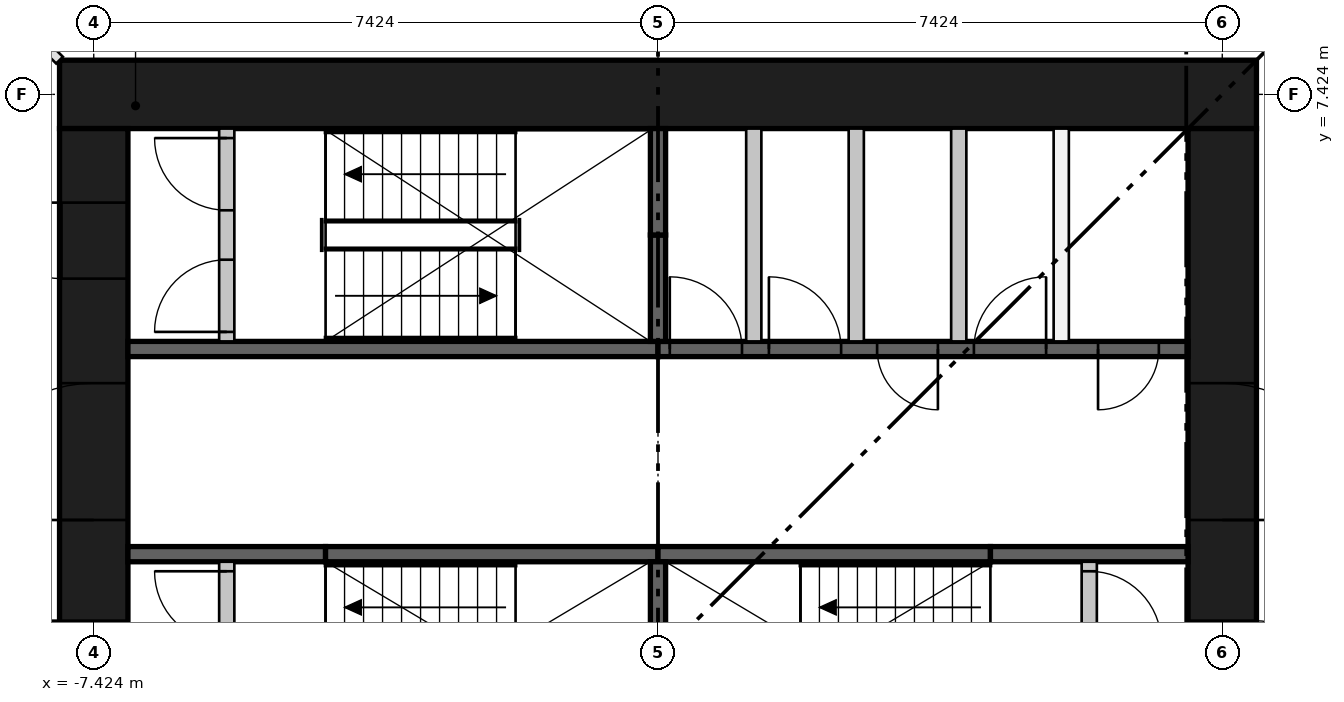
"""IFC4 building model, lengths in metres.
Left out: names, types, materials, properties, quantities, classifications, styles, units other than length and angle.
Written with IfcOpenShell. Run it as: python <this file> out.ifc"""

import sys

from ifc_helpers import new_model, si_unit, direction, frame, frame_2d, origin, place, context, subcontext, project, spatial, rectangle, extrude, element, fill, save


model = new_model("IFC4")
c1 = context("Model", 3, precision=1e-05, world=origin(), true_north=direction((0.0, 1.0)))
c2 = subcontext(c1, "Body", "Model", "MODEL_VIEW")
j1 = project(units=[si_unit("LENGTHUNIT", "METRE"), si_unit("PLANEANGLEUNIT", "RADIAN")], contexts=[c1])
p1 = place(None, origin())
s1 = spatial("IfcSite", under=j1, at=p1, CompositionType="ELEMENT")
p2 = place(p1, origin())
s2 = spatial("IfcBuilding", under=s1, at=p2, CompositionType="ELEMENT")
p3 = place(p2, frame((0.0, 0.0, 9.9)))
s3 = spatial("IfcBuildingStorey", under=s2, at=p3, CompositionType="ELEMENT", Elevation=9.9)
p4 = place(p3, frame((-7.874, 7.424, 0.0), z_axis=(0.0, 0.0, 1.0), x_axis=(1.0, 0.0, 0.0)))
e1 = element("IfcWall", 1, at=p4, inside=s3, PredefinedType="SHEAR", context=c2, shape_type="SweptSolid", body=[
    extrude(rectangle(XDim=15.748, YDim=0.9, at=frame_2d((7.874, 0.0))), origin(), (0.0, 0.0, 1.0), 4.5),
])
p5 = place(p3, frame((-7.424, -6.974, 0.0), z_axis=(0.0, 0.0, 1.0), x_axis=(0.0, 1.0, 0.0)))
e2 = element("IfcWall", 2, at=p5, inside=s3, PredefinedType="SHEAR", context=c2, shape_type="SweptSolid", body=[
    extrude(rectangle(XDim=13.948, YDim=0.9, at=frame_2d((6.974, 0.0))), origin(), (0.0, 0.0, 1.0), 4.5),
])
p6 = place(p5, frame((6.474, 0.0, 0.0)))
e3 = element("IfcOpeningElement", 3, at=p6, cuts=e2, PredefinedType="OPENING", context=c2, shape_type="SweptSolid", body=[
    extrude(rectangle(XDim=1.0, YDim=2.1, at=frame_2d((0.5, 1.05))), frame((0.0, 0.46, 0.0), z_axis=(0.0, -1.0, 0.0), x_axis=(1.0, 0.0, 0.0)), (0.0, 0.0, 1.0), 0.92),
])
p7 = place(p5, frame((3.35, 0.0, 0.0)))
e4 = element("IfcOpeningElement", 4, at=p7, cuts=e2, PredefinedType="OPENING", context=c2, shape_type="SweptSolid", body=[
    extrude(rectangle(XDim=1.8, YDim=2.1, at=frame_2d((0.9, 1.05))), frame((0.0, 0.46, 0.0), z_axis=(0.0, -1.0, 0.0), x_axis=(1.0, 0.0, 0.0)), (0.0, 0.0, 1.0), 0.92),
])
p8 = place(p5, frame((8.799, 0.0, 0.0)))
e5 = element("IfcOpeningElement", 5, at=p8, cuts=e2, PredefinedType="OPENING", context=c2, shape_type="SweptSolid", body=[
    extrude(rectangle(XDim=1.8, YDim=2.1, at=frame_2d((0.9, 1.05))), frame((0.0, 0.46, 0.0), z_axis=(0.0, -1.0, 0.0), x_axis=(1.0, 0.0, 0.0)), (0.0, 0.0, 1.0), 0.92),
])
p9 = place(p5, frame((11.974, 0.0, 0.0)))
e6 = element("IfcOpeningElement", 6, at=p9, cuts=e2, PredefinedType="OPENING", context=c2, shape_type="SweptSolid", body=[
    extrude(rectangle(XDim=1.0, YDim=2.1, at=frame_2d((0.5, 1.05))), frame((0.0, 0.46, 0.0), z_axis=(0.0, -1.0, 0.0), x_axis=(1.0, 0.0, 0.0)), (0.0, 0.0, 1.0), 0.92),
])
p10 = place(p3, frame((7.424, -6.974, 0.0), z_axis=(0.0, 0.0, 1.0), x_axis=(0.0, 1.0, 0.0)))
e7 = element("IfcWall", 7, at=p10, inside=s3, PredefinedType="SHEAR", context=c2, shape_type="SweptSolid", body=[
    extrude(rectangle(XDim=13.948, YDim=0.9, at=frame_2d((6.974, 0.0))), origin(), (0.0, 0.0, 1.0), 4.5),
])
p11 = place(p10, frame((6.474, 0.0, 0.0)))
e8 = element("IfcOpeningElement", 8, at=p11, cuts=e7, PredefinedType="OPENING", context=c2, shape_type="SweptSolid", body=[
    extrude(rectangle(XDim=1.0, YDim=2.1, at=frame_2d((0.5, 1.05))), frame((0.0, 0.46, 0.0), z_axis=(0.0, -1.0, 0.0), x_axis=(1.0, 0.0, 0.0)), (0.0, 0.0, 1.0), 0.92),
])
p12 = place(p10, frame((3.35, 0.0, 0.0)))
e9 = element("IfcOpeningElement", 9, at=p12, cuts=e7, PredefinedType="OPENING", context=c2, shape_type="SweptSolid", body=[
    extrude(rectangle(XDim=1.8, YDim=2.1, at=frame_2d((0.9, 1.05))), frame((0.0, 0.46, 0.0), z_axis=(0.0, -1.0, 0.0), x_axis=(1.0, 0.0, 0.0)), (0.0, 0.0, 1.0), 0.92),
])
p13 = place(p10, frame((8.799, 0.0, 0.0)))
e10 = element("IfcOpeningElement", 10, at=p13, cuts=e7, PredefinedType="OPENING", context=c2, shape_type="SweptSolid", body=[
    extrude(rectangle(XDim=1.8, YDim=2.1, at=frame_2d((0.9, 1.05))), frame((0.0, 0.46, 0.0), z_axis=(0.0, -1.0, 0.0), x_axis=(1.0, 0.0, 0.0)), (0.0, 0.0, 1.0), 0.92),
])
p14 = place(p3, frame((-6.974, 4.074, 0.0), z_axis=(0.0, 0.0, 1.0), x_axis=(1.0, 0.0, 0.0)))
e11 = element("IfcWall", 11, at=p14, inside=s3, PredefinedType="SHEAR", context=c2, shape_type="SweptSolid", body=[
    extrude(rectangle(XDim=6.974, YDim=0.2, at=frame_2d((3.487, 0.0))), origin(), (0.0, 0.0, 1.0), 4.1),
])
p15 = place(p3, frame((0.0, 4.074, 0.0), z_axis=(0.0, 0.0, 1.0), x_axis=(1.0, 0.0, 0.0)))
e12 = element("IfcWall", 12, at=p15, inside=s3, PredefinedType="SHEAR", context=c2, shape_type="SweptSolid", body=[
    extrude(rectangle(XDim=6.974, YDim=0.2, at=frame_2d((3.487, 0.0))), origin(), (0.0, 0.0, 1.0), 4.1),
])
p16 = place(p15, frame((0.155, 0.0, 0.0)))
e13 = element("IfcOpeningElement", 13, at=p16, cuts=e12, PredefinedType="OPENING", context=c2, shape_type="SweptSolid", body=[
    extrude(rectangle(XDim=0.95, YDim=2.1, at=frame_2d((0.475, 1.05))), frame((0.0, 0.11, 0.0), z_axis=(0.0, -1.0, 0.0), x_axis=(1.0, 0.0, 0.0)), (0.0, 0.0, 1.0), 0.22),
])
p17 = place(p15, frame((1.459, 0.0, 0.0)))
e14 = element("IfcOpeningElement", 14, at=p17, cuts=e12, PredefinedType="OPENING", context=c2, shape_type="SweptSolid", body=[
    extrude(rectangle(XDim=0.95, YDim=2.1, at=frame_2d((0.475, 1.05))), frame((0.0, 0.11, 0.0), z_axis=(0.0, -1.0, 0.0), x_axis=(1.0, 0.0, 0.0)), (0.0, 0.0, 1.0), 0.22),
])
p18 = place(p15, frame((2.883, 0.0, 0.0)))
e15 = element("IfcOpeningElement", 15, at=p18, cuts=e12, PredefinedType="OPENING", context=c2, shape_type="SweptSolid", body=[
    extrude(rectangle(XDim=0.8, YDim=2.1, at=frame_2d((0.4, 1.05))), frame((0.0, 0.11, 0.0), z_axis=(0.0, -1.0, 0.0), x_axis=(1.0, 0.0, 0.0)), (0.0, 0.0, 1.0), 0.22),
])
p19 = place(p15, frame((4.156, 0.0, 0.0)))
e16 = element("IfcOpeningElement", 16, at=p19, cuts=e12, PredefinedType="OPENING", context=c2, shape_type="SweptSolid", body=[
    extrude(rectangle(XDim=0.95, YDim=2.1, at=frame_2d((0.475, 1.05))), frame((0.0, 0.11, 0.0), z_axis=(0.0, -1.0, 0.0), x_axis=(1.0, 0.0, 0.0)), (0.0, 0.0, 1.0), 0.22),
])
p20 = place(p15, frame((5.79, 0.0, 0.0)))
e17 = element("IfcOpeningElement", 17, at=p20, cuts=e12, PredefinedType="OPENING", context=c2, shape_type="SweptSolid", body=[
    extrude(rectangle(XDim=0.8, YDim=2.1, at=frame_2d((0.4, 1.05))), frame((0.0, 0.11, 0.0), z_axis=(0.0, -1.0, 0.0), x_axis=(1.0, 0.0, 0.0)), (0.0, 0.0, 1.0), 0.22),
])
p21 = place(p3, frame((-6.974, 1.375, 0.0), z_axis=(0.0, 0.0, 1.0), x_axis=(1.0, 0.0, 0.0)))
e18 = element("IfcWall", 18, at=p21, inside=s3, PredefinedType="SHEAR", context=c2, shape_type="SweptSolid", body=[
    extrude(rectangle(XDim=2.6, YDim=0.2, at=frame_2d((1.3, 0.0))), origin(), (0.0, 0.0, 1.0), 4.1),
])
for number, where, z_axis, x_axis in (
    (19, (-4.374, 1.375, 0.0), (0.0, 0.0, 1.0), (1.0, 0.0, 0.0)),
    (20, (0.0, 1.375, 0.0), (0.0, 0.0, 1.0), (1.0, 0.0, 0.0)),
):
    element("IfcWall", number, at=place(p3, frame(where, z_axis=z_axis, x_axis=x_axis)), inside=s3, PredefinedType="SHEAR", context=c2, shape_type="SweptSolid", body=[
        extrude(rectangle(XDim=4.374, YDim=0.2, at=frame_2d((2.187, 0.0))), origin(), (0.0, 0.0, 1.0), 4.1),
    ])
p22 = place(p3, frame((4.374, 1.375, 0.0), z_axis=(0.0, 0.0, 1.0), x_axis=(1.0, 0.0, 0.0)))
e21 = element("IfcWall", 21, at=p22, inside=s3, PredefinedType="SHEAR", context=c2, shape_type="SweptSolid", body=[
    extrude(rectangle(XDim=2.6, YDim=0.2, at=frame_2d((1.3, 0.0))), origin(), (0.0, 0.0, 1.0), 4.1),
])
p23 = place(p3, frame((0.0, -1.275, 0.0), z_axis=(0.0, 0.0, 1.0), x_axis=(0.0, 1.0, 0.0)))
e22 = element("IfcWall", 22, at=p23, inside=s3, PredefinedType="SHEAR", context=c2, shape_type="SweptSolid", body=[
    extrude(rectangle(XDim=2.55, YDim=0.2, at=frame_2d((1.275, 0.0))), origin(), (0.0, 0.0, 1.0), 4.1),
])
p24 = place(p3, frame((0.0, 4.174, 0.0), z_axis=(0.0, 0.0, 1.0), x_axis=(0.0, 1.0, 0.0)))
e23 = element("IfcWall", 23, at=p24, inside=s3, PredefinedType="SHEAR", context=c2, shape_type="SweptSolid", body=[
    extrude(rectangle(XDim=1.4, YDim=0.2, at=frame_2d((0.7, 0.0))), origin(), (0.0, 0.0, 1.0), 4.1),
])
p25 = place(p3, frame((0.0, 5.574, 0.0), z_axis=(0.0, 0.0, 1.0), x_axis=(0.0, 1.0, 0.0)))
e24 = element("IfcWall", 24, at=p25, inside=s3, PredefinedType="SHEAR", context=c2, shape_type="SweptSolid", body=[
    extrude(rectangle(XDim=1.4, YDim=0.2, at=frame_2d((0.7, 0.0))), origin(), (0.0, 0.0, 1.0), 4.1),
])
for number, where, z_axis, x_axis in (
    (25, (1.26, 4.174, 0.0), (0.0, 0.0, 1.0), (0.0, 1.0, 0.0)),
    (26, (2.609, 4.174, 0.0), (0.0, 0.0, 1.0), (0.0, 1.0, 0.0)),
    (27, (3.957, 4.174, 0.0), (0.0, 0.0, 1.0), (0.0, 1.0, 0.0)),
    (28, (5.305, 4.174, 0.0), (0.0, 0.0, 1.0), (0.0, 1.0, 0.0)),
):
    element("IfcWall", number, at=place(p3, frame(where, z_axis=z_axis, x_axis=x_axis)), inside=s3, PredefinedType="PARTITIONING", context=c2, shape_type="SweptSolid", body=[
        extrude(rectangle(XDim=2.8, YDim=0.2, at=frame_2d((1.4, 0.0))), origin(), (0.0, 0.0, 1.0), 4.1),
    ])
p26 = place(p3, frame((-5.674, -1.275, 0.0), z_axis=(0.0, 0.0, 1.0), x_axis=(0.0, 1.0, 0.0)))
e29 = element("IfcWall", 29, at=p26, inside=s3, PredefinedType="PARTITIONING", context=c2, shape_type="SweptSolid", body=[
    extrude(rectangle(XDim=2.55, YDim=0.2, at=frame_2d((1.275, 0.0))), origin(), (0.0, 0.0, 1.0), 4.1),
])
p27 = place(p26, frame((0.125, 0.0, 0.0)))
e30 = element("IfcOpeningElement", 30, at=p27, cuts=e29, PredefinedType="OPENING", context=c2, shape_type="SweptSolid", body=[
    extrude(rectangle(XDim=0.95, YDim=2.1, at=frame_2d((0.475, 1.05))), frame((0.0, 0.11, 0.0), z_axis=(0.0, -1.0, 0.0), x_axis=(1.0, 0.0, 0.0)), (0.0, 0.0, 1.0), 0.22),
])
p28 = place(p26, frame((1.475, 0.0, 0.0)))
e31 = element("IfcOpeningElement", 31, at=p28, cuts=e29, PredefinedType="OPENING", context=c2, shape_type="SweptSolid", body=[
    extrude(rectangle(XDim=0.95, YDim=2.1, at=frame_2d((0.475, 1.05))), frame((0.0, 0.11, 0.0), z_axis=(0.0, -1.0, 0.0), x_axis=(1.0, 0.0, 0.0)), (0.0, 0.0, 1.0), 0.22),
])
p29 = place(p3, frame((5.674, -1.275, 0.0), z_axis=(0.0, 0.0, 1.0), x_axis=(0.0, 1.0, 0.0)))
e32 = element("IfcWall", 32, at=p29, inside=s3, PredefinedType="PARTITIONING", context=c2, shape_type="SweptSolid", body=[
    extrude(rectangle(XDim=2.55, YDim=0.2, at=frame_2d((1.275, 0.0))), origin(), (0.0, 0.0, 1.0), 4.1),
])
p30 = place(p29, frame((0.125, 0.0, 0.0)))
e33 = element("IfcOpeningElement", 33, at=p30, cuts=e32, PredefinedType="OPENING", context=c2, shape_type="SweptSolid", body=[
    extrude(rectangle(XDim=0.95, YDim=2.1, at=frame_2d((0.475, 1.05))), frame((0.0, 0.11, 0.0), z_axis=(0.0, -1.0, 0.0), x_axis=(1.0, 0.0, 0.0)), (0.0, 0.0, 1.0), 0.22),
])
p31 = place(p29, frame((1.475, 0.0, 0.0)))
e34 = element("IfcOpeningElement", 34, at=p31, cuts=e32, PredefinedType="OPENING", context=c2, shape_type="SweptSolid", body=[
    extrude(rectangle(XDim=0.95, YDim=2.1, at=frame_2d((0.475, 1.05))), frame((0.0, 0.11, 0.0), z_axis=(0.0, -1.0, 0.0), x_axis=(1.0, 0.0, 0.0)), (0.0, 0.0, 1.0), 0.22),
])
p32 = place(p3, frame((-5.674, 4.174, 0.0), z_axis=(0.0, 0.0, 1.0), x_axis=(0.0, 1.0, 0.0)))
e35 = element("IfcWall", 35, at=p32, inside=s3, PredefinedType="PARTITIONING", context=c2, shape_type="SweptSolid", body=[
    extrude(rectangle(XDim=2.8, YDim=0.2, at=frame_2d((1.4, 0.0))), origin(), (0.0, 0.0, 1.0), 4.1),
])
p33 = place(p32, frame((0.125, 0.0, 0.0)))
e36 = element("IfcOpeningElement", 36, at=p33, cuts=e35, PredefinedType="OPENING", context=c2, shape_type="SweptSolid", body=[
    extrude(rectangle(XDim=0.95, YDim=2.1, at=frame_2d((0.475, 1.05))), frame((0.0, 0.11, 0.0), z_axis=(0.0, -1.0, 0.0), x_axis=(1.0, 0.0, 0.0)), (0.0, 0.0, 1.0), 0.22),
])
p34 = place(p32, frame((1.725, 0.0, 0.0)))
e37 = element("IfcOpeningElement", 37, at=p34, cuts=e35, PredefinedType="OPENING", context=c2, shape_type="SweptSolid", body=[
    extrude(rectangle(XDim=0.95, YDim=2.1, at=frame_2d((0.475, 1.05))), frame((0.0, 0.11, 0.0), z_axis=(0.0, -1.0, 0.0), x_axis=(1.0, 0.0, 0.0)), (0.0, 0.0, 1.0), 0.22),
])
p35 = place(p3, frame((-7.874, 7.874, 0.0), z_axis=(0.0, 0.0, 1.0), x_axis=(-0.707106781187, 0.707106781187, 0.0)))
e38 = element("IfcWall", 38, at=p35, inside=s3, PredefinedType="PARTITIONING", context=c2, shape_type="SweptSolid", body=[
    extrude(rectangle(XDim=2.165, YDim=0.125, at=frame_2d((1.082, 0.0))), origin(), (0.0, 0.0, 1.0), 4.1),
])
p36 = place(p35, frame((0.6, 0.0, 0.0)))
e39 = element("IfcOpeningElement", 39, at=p36, cuts=e38, PredefinedType="OPENING", context=c2, shape_type="SweptSolid", body=[
    extrude(rectangle(XDim=1.0, YDim=2.1, at=frame_2d((0.5, 1.05))), frame((0.0, 0.073, 0.0), z_axis=(0.0, -1.0, 0.0), x_axis=(1.0, 0.0, 0.0)), (0.0, 0.0, 1.0), 0.145),
])
p37 = place(p28, origin())
e40 = element("IfcDoor", 40, at=p37, inside=s3, OperationType="SINGLE_SWING_RIGHT", PredefinedType="DOOR", context=c2, shape_type="SweptSolid", body=[
    extrude(rectangle(XDim=0.95, YDim=2.1, at=frame_2d((0.475, 1.05))), frame((0.0, 0.025, 0.0), z_axis=(0.0, -1.0, 0.0), x_axis=(1.0, 0.0, 0.0)), (0.0, 0.0, 1.0), 0.05),
])
fill(e31, e40)
p38 = place(p31, frame((0.95, 0.0, 0.0), z_axis=(0.0, 0.0, 1.0), x_axis=(-1.0, 0.0, 0.0)))
e41 = element("IfcDoor", 41, at=p38, inside=s3, OperationType="SINGLE_SWING_LEFT", PredefinedType="DOOR", context=c2, shape_type="SweptSolid", body=[
    extrude(rectangle(XDim=0.95, YDim=2.1, at=frame_2d((0.475, 1.05))), frame((0.0, 0.025, 0.0), z_axis=(0.0, -1.0, 0.0), x_axis=(1.0, 0.0, 0.0)), (0.0, 0.0, 1.0), 0.05),
])
fill(e34, e41)
p39 = place(p33, origin())
e42 = element("IfcDoor", 42, at=p39, inside=s3, OperationType="SINGLE_SWING_LEFT", PredefinedType="DOOR", context=c2, shape_type="SweptSolid", body=[
    extrude(rectangle(XDim=0.95, YDim=2.1, at=frame_2d((0.475, 1.05))), frame((0.0, 0.025, 0.0), z_axis=(0.0, -1.0, 0.0), x_axis=(1.0, 0.0, 0.0)), (0.0, 0.0, 1.0), 0.05),
])
fill(e36, e42)
p40 = place(p34, origin())
e43 = element("IfcDoor", 43, at=p40, inside=s3, OperationType="SINGLE_SWING_RIGHT", PredefinedType="DOOR", context=c2, shape_type="SweptSolid", body=[
    extrude(rectangle(XDim=0.95, YDim=2.1, at=frame_2d((0.475, 1.05))), frame((0.0, 0.025, 0.0), z_axis=(0.0, -1.0, 0.0), x_axis=(1.0, 0.0, 0.0)), (0.0, 0.0, 1.0), 0.05),
])
fill(e37, e43)
p41 = place(p16, origin())
e44 = element("IfcDoor", 44, at=p41, inside=s3, OperationType="SINGLE_SWING_LEFT", PredefinedType="DOOR", context=c2, shape_type="SweptSolid", body=[
    extrude(rectangle(XDim=0.95, YDim=2.1, at=frame_2d((0.475, 1.05))), frame((0.0, 0.025, 0.0), z_axis=(0.0, -1.0, 0.0), x_axis=(1.0, 0.0, 0.0)), (0.0, 0.0, 1.0), 0.05),
])
fill(e13, e44)
p42 = place(p17, origin())
e45 = element("IfcDoor", 45, at=p42, inside=s3, OperationType="SINGLE_SWING_LEFT", PredefinedType="DOOR", context=c2, shape_type="SweptSolid", body=[
    extrude(rectangle(XDim=0.95, YDim=2.1, at=frame_2d((0.475, 1.05))), frame((0.0, 0.025, 0.0), z_axis=(0.0, -1.0, 0.0), x_axis=(1.0, 0.0, 0.0)), (0.0, 0.0, 1.0), 0.05),
])
fill(e14, e45)
p43 = place(p18, frame((0.8, 0.0, 0.0), z_axis=(0.0, 0.0, 1.0), x_axis=(-1.0, 0.0, 0.0)))
e46 = element("IfcDoor", 46, at=p43, inside=s3, OperationType="SINGLE_SWING_RIGHT", PredefinedType="DOOR", context=c2, shape_type="SweptSolid", body=[
    extrude(rectangle(XDim=0.8, YDim=2.1, at=frame_2d((0.4, 1.05))), frame((0.0, 0.025, 0.0), z_axis=(0.0, -1.0, 0.0), x_axis=(1.0, 0.0, 0.0)), (0.0, 0.0, 1.0), 0.05),
])
fill(e15, e46)
p44 = place(p19, origin())
e47 = element("IfcDoor", 47, at=p44, inside=s3, OperationType="SINGLE_SWING_RIGHT", PredefinedType="DOOR", context=c2, shape_type="SweptSolid", body=[
    extrude(rectangle(XDim=0.95, YDim=2.1, at=frame_2d((0.475, 1.05))), frame((0.0, 0.025, 0.0), z_axis=(0.0, -1.0, 0.0), x_axis=(1.0, 0.0, 0.0)), (0.0, 0.0, 1.0), 0.05),
])
fill(e16, e47)
p45 = place(p20, frame((0.8, 0.0, 0.0), z_axis=(0.0, 0.0, 1.0), x_axis=(-1.0, 0.0, 0.0)))
e48 = element("IfcDoor", 48, at=p45, inside=s3, OperationType="SINGLE_SWING_LEFT", PredefinedType="DOOR", context=c2, shape_type="SweptSolid", body=[
    extrude(rectangle(XDim=0.8, YDim=2.1, at=frame_2d((0.4, 1.05))), frame((0.0, 0.025, 0.0), z_axis=(0.0, -1.0, 0.0), x_axis=(1.0, 0.0, 0.0)), (0.0, 0.0, 1.0), 0.05),
])
fill(e17, e48)
p46 = place(p6, origin())
e49 = element("IfcDoor", 49, at=p46, inside=s3, OperationType="SINGLE_SWING_RIGHT", PredefinedType="DOOR", context=c2, shape_type="SweptSolid", body=[
    extrude(rectangle(XDim=1.0, YDim=2.1, at=frame_2d((0.5, 1.05))), frame((0.0, 0.45, 0.0), z_axis=(0.0, -1.0, 0.0), x_axis=(1.0, 0.0, 0.0)), (0.0, 0.0, 1.0), 0.05),
])
fill(e3, e49)
p47 = place(p8, origin())
e50 = element("IfcDoor", 50, at=p47, inside=s3, OperationType="DOUBLE_DOOR_SINGLE_SWING", PredefinedType="DOOR", context=c2, shape_type="SweptSolid", body=[
    extrude(rectangle(XDim=1.8, YDim=2.1, at=frame_2d((0.9, 1.05))), frame((0.0, 0.025, 0.0), z_axis=(0.0, -1.0, 0.0), x_axis=(1.0, 0.0, 0.0)), (0.0, 0.0, 1.0), 0.05),
])
fill(e5, e50)
p48 = place(p9, origin())
e51 = element("IfcDoor", 51, at=p48, inside=s3, OperationType="SINGLE_SWING_RIGHT", PredefinedType="DOOR", context=c2, shape_type="SweptSolid", body=[
    extrude(rectangle(XDim=1.0, YDim=2.1, at=frame_2d((0.5, 1.05))), frame((0.0, 0.45, 0.0), z_axis=(0.0, -1.0, 0.0), x_axis=(1.0, 0.0, 0.0)), (0.0, 0.0, 1.0), 0.05),
])
fill(e6, e51)
p49 = place(p11, frame((1.0, 0.0, 0.0), z_axis=(0.0, 0.0, 1.0), x_axis=(-1.0, 0.0, 0.0)))
e52 = element("IfcDoor", 52, at=p49, inside=s3, OperationType="SINGLE_SWING_LEFT", PredefinedType="DOOR", context=c2, shape_type="SweptSolid", body=[
    extrude(rectangle(XDim=1.0, YDim=2.1, at=frame_2d((0.5, 1.05))), frame((0.0, 0.45, 0.0), z_axis=(0.0, -1.0, 0.0), x_axis=(1.0, 0.0, 0.0)), (0.0, 0.0, 1.0), 0.05),
])
fill(e8, e52)
p50 = place(p13, frame((1.8, 0.0, 0.0), z_axis=(0.0, 0.0, 1.0), x_axis=(-1.0, 0.0, 0.0)))
e53 = element("IfcDoor", 53, at=p50, inside=s3, OperationType="DOUBLE_DOOR_SINGLE_SWING", PredefinedType="DOOR", context=c2, shape_type="SweptSolid", body=[
    extrude(rectangle(XDim=1.8, YDim=2.1, at=frame_2d((0.9, 1.05))), frame((0.0, 0.025, 0.0), z_axis=(0.0, -1.0, 0.0), x_axis=(1.0, 0.0, 0.0)), (0.0, 0.0, 1.0), 0.05),
])
fill(e10, e53)
save(model, sys.argv[1])
